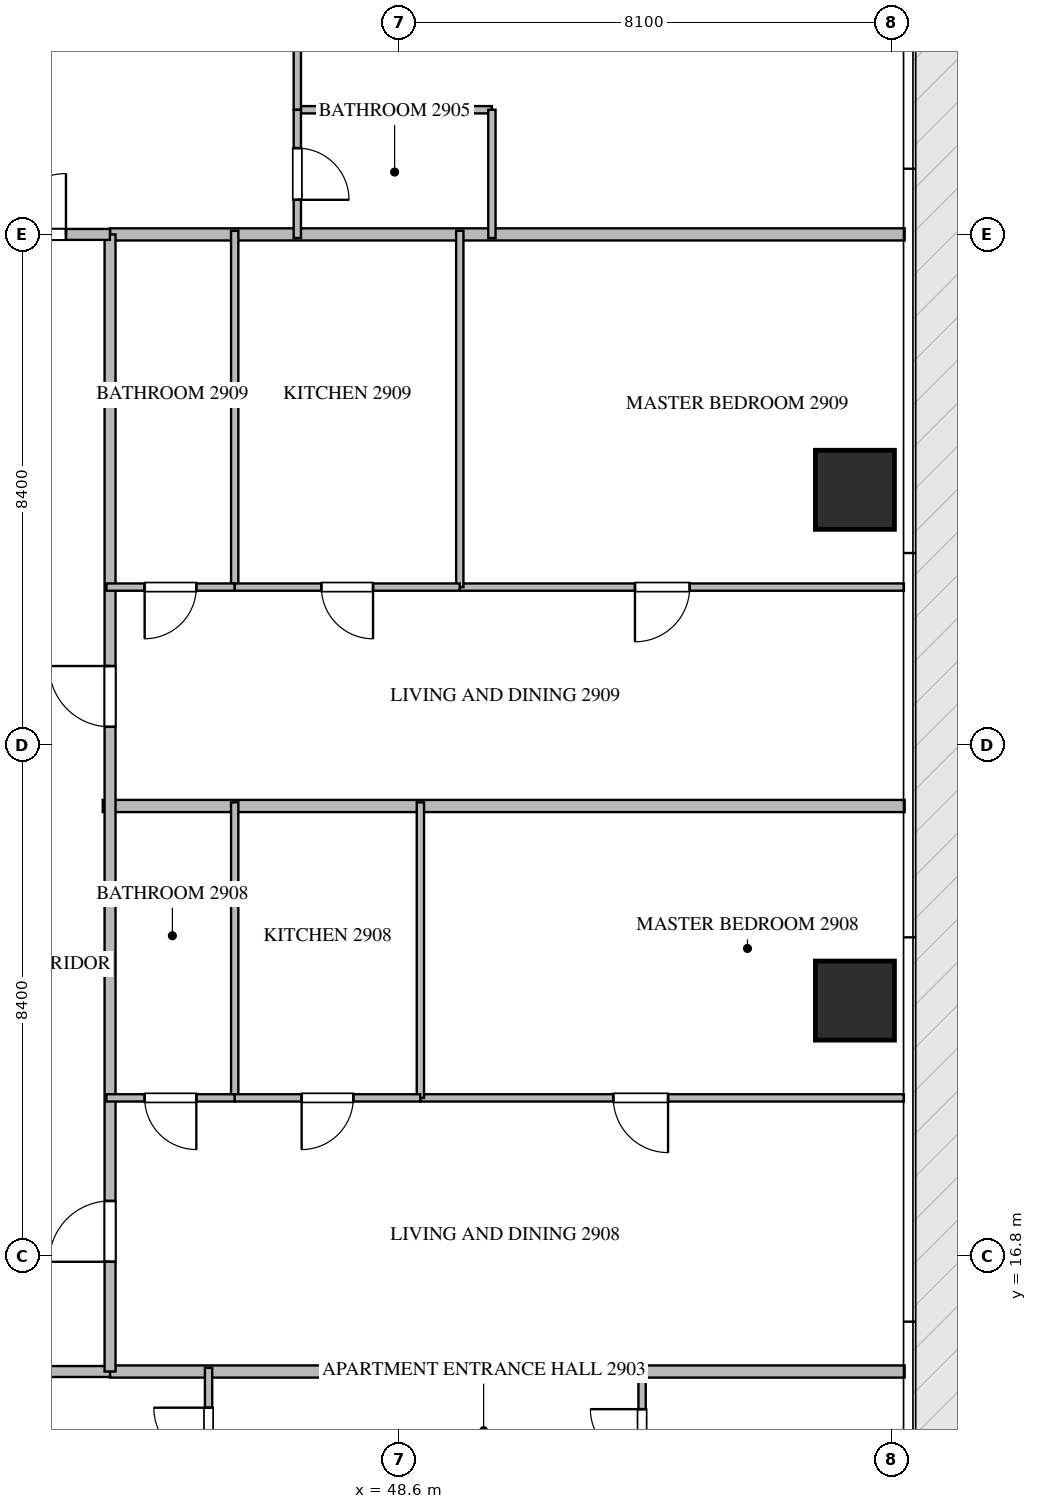
"""IFC4 building model, lengths in metres.
Left out: names, types, materials, properties, quantities, classifications, styles, units other than length and angle.
Written with IfcOpenShell. Run it as: python <this file> out.ifc"""

import sys

from ifc_helpers import new_model, si_unit, direction, frame, frame_2d, origin, origin_2d, place, context, subcontext, project, spatial, rectangle, extrude, source, transform, mapped, element, fill, save


model = new_model("IFC4")
c1 = context("Model", 3, precision=1e-05, world=origin(), true_north=direction((0.0, 1.0)))
c2 = subcontext(c1, "Body", "Model", "MODEL_VIEW")
j1 = project(units=[si_unit("LENGTHUNIT", "METRE"), si_unit("PLANEANGLEUNIT", "RADIAN")], contexts=[c1])
p1 = place(None, origin())
s1 = spatial("IfcSite", under=j1, at=p1, CompositionType="ELEMENT")
p2 = place(p1, origin())
s2 = spatial("IfcBuilding", under=s1, at=p2, CompositionType="ELEMENT")
p3 = place(p2, frame((0.0, 0.0, 120.15)))
s3 = spatial("IfcBuildingStorey", under=s2, at=p3, CompositionType="ELEMENT", Elevation=120.15)
m1 = source(origin(), c2, "Body", "SweptSolid", [
    extrude(rectangle(XDim=1.3, YDim=1.3, at=origin_2d()), origin(), (0.0, 0.0, 1.0), 3.93),
])
for number, where, z_axis, x_axis in (
    (1, (56.1, 21.0, -0.44), (0.0, 0.0, 1.0), (1.0, 0.0, 0.0)),
    (2, (56.1, 29.4, -0.44), (0.0, 0.0, 1.0), (1.0, 0.0, 0.0)),
):
    element("IfcColumn", number, at=place(p3, frame(where, z_axis=z_axis, x_axis=x_axis)), inside=s3, PredefinedType="COLUMN", context=c2, shape_type="MappedRepresentation", body=[
        mapped(m1, transform((0.0, 0.0, 0.0), scale=1.0)),
    ])
p4 = place(p3, frame((43.73, 24.2, 0.0), z_axis=(0.0, 0.0, 1.0), x_axis=(1.0, 0.0, 0.0)))
e3 = element("IfcWall", 3, at=p4, inside=s3, PredefinedType="PARTITIONING", context=c2, shape_type="SweptSolid", body=[
    extrude(rectangle(XDim=13.188, YDim=0.2, at=frame_2d((6.594, 0.0))), origin(), (0.0, 0.0, 1.0), 3.49),
])
for number, where, z_axis, x_axis in (
    (4, (43.85, 14.9, 0.0), (0.0, 0.0, 1.0), (1.0, 0.0, 0.0)),
    (5, (43.85, 33.6, 0.0), (0.0, 0.0, 1.0), (1.0, 0.0, 0.0)),
):
    element("IfcWall", number, at=place(p3, frame(where, z_axis=z_axis, x_axis=x_axis)), inside=s3, PredefinedType="PARTITIONING", context=c2, shape_type="SweptSolid", body=[
        extrude(rectangle(XDim=13.068, YDim=0.2, at=frame_2d((6.534, 0.0))), origin(), (0.0, 0.0, 1.0), 3.49),
    ])
p5 = place(p3, frame((20.952, 14.9, 0.0), z_axis=(0.0, 0.0, 1.0), x_axis=(1.0, 0.0, 0.0)))
e6 = element("IfcWall", 6, at=p5, inside=s3, PredefinedType="PARTITIONING", context=c2, shape_type="SweptSolid", body=[
    extrude(rectangle(XDim=22.896, YDim=0.18, at=frame_2d((11.448, 0.0))), origin(), (0.0, 0.0, 1.0), 3.49),
])
p6 = place(p5, frame((2.781, 0.0, 0.0)))
e7 = element("IfcOpeningElement", 7, at=p6, cuts=e6, PredefinedType="OPENING", context=c2, shape_type="SweptSolid", body=[
    extrude(rectangle(XDim=1.0, YDim=2.15, at=frame_2d((0.5, 1.075))), frame((0.0, 0.1, 0.0), z_axis=(0.0, -1.0, 0.0), x_axis=(1.0, 0.0, 0.0)), (0.0, 0.0, 1.0), 0.2),
])
p7 = place(p5, frame((7.16, 0.0, 0.0)))
e8 = element("IfcOpeningElement", 8, at=p7, cuts=e6, PredefinedType="OPENING", context=c2, shape_type="SweptSolid", body=[
    extrude(rectangle(XDim=1.0, YDim=2.15, at=frame_2d((0.5, 1.075))), frame((0.0, 0.1, 0.0), z_axis=(0.0, -1.0, 0.0), x_axis=(1.0, 0.0, 0.0)), (0.0, 0.0, 1.0), 0.2),
])
p8 = place(p5, frame((19.115, 0.0, 0.0)))
e9 = element("IfcOpeningElement", 9, at=p8, cuts=e6, PredefinedType="OPENING", context=c2, shape_type="SweptSolid", body=[
    extrude(rectangle(XDim=1.0, YDim=2.15, at=frame_2d((0.5, 1.075))), frame((0.0, 0.1, 0.0), z_axis=(0.0, -1.0, 0.0), x_axis=(1.0, 0.0, 0.0)), (0.0, 0.0, 1.0), 0.2),
])
p9 = place(p3, frame((43.85, 14.9, 0.0), z_axis=(0.0, 0.0, 1.0), x_axis=(0.0, 1.0, 0.0)))
e10 = element("IfcWall", 10, at=p9, inside=s3, PredefinedType="PARTITIONING", context=c2, shape_type="SweptSolid", body=[
    extrude(rectangle(XDim=18.7, YDim=0.18, at=frame_2d((9.35, 0.0))), origin(), (0.0, 0.0, 1.0), 3.49),
])
p10 = place(p9, frame((1.805, 0.0, 0.0)))
e11 = element("IfcOpeningElement", 11, at=p10, cuts=e10, PredefinedType="OPENING", context=c2, shape_type="SweptSolid", body=[
    extrude(rectangle(XDim=1.0, YDim=2.15, at=frame_2d((0.5, 1.075))), frame((0.0, 0.1, 0.0), z_axis=(0.0, -1.0, 0.0), x_axis=(1.0, 0.0, 0.0)), (0.0, 0.0, 1.0), 0.2),
])
p11 = place(p9, frame((10.602, 0.0, 0.0)))
e12 = element("IfcOpeningElement", 12, at=p11, cuts=e10, PredefinedType="OPENING", context=c2, shape_type="SweptSolid", body=[
    extrude(rectangle(XDim=1.0, YDim=2.15, at=frame_2d((0.5, 1.075))), frame((0.0, 0.1, 0.0), z_axis=(0.0, -1.0, 0.0), x_axis=(1.0, 0.0, 0.0)), (0.0, 0.0, 1.0), 0.2),
])
p12 = place(p3, frame((41.402, 33.6, 0.0), z_axis=(0.0, 0.0, 1.0), x_axis=(1.0, 0.0, 0.0)))
e13 = element("IfcWall", 13, at=p12, inside=s3, PredefinedType="PARTITIONING", context=c2, shape_type="SweptSolid", body=[
    extrude(rectangle(XDim=2.446, YDim=0.18, at=frame_2d((1.223, 0.0))), origin(), (0.0, 0.0, 1.0), 3.49),
])
p13 = place(p12, frame((0.723, 0.0, 0.0)))
e14 = element("IfcOpeningElement", 14, at=p13, cuts=e13, PredefinedType="OPENING", context=c2, shape_type="SweptSolid", body=[
    extrude(rectangle(XDim=1.0, YDim=2.15, at=frame_2d((0.5, 1.075))), frame((0.0, 0.1, 0.0), z_axis=(0.0, -1.0, 0.0), x_axis=(1.0, 0.0, 0.0)), (0.0, 0.0, 1.0), 0.2),
])
p14 = place(p3, frame((45.47, 12.75, 0.0), z_axis=(0.0, 0.0, 1.0), x_axis=(0.0, 1.0, 0.0)))
e15 = element("IfcWall", 15, at=p14, inside=s3, PredefinedType="PARTITIONING", context=c2, shape_type="SweptSolid", body=[
    extrude(rectangle(XDim=2.21, YDim=0.12, at=frame_2d((1.105, 0.0))), origin(), (0.0, 0.0, 1.0), 3.49),
])
p15 = place(p14, frame((0.655, 0.0, 0.0)))
e16 = element("IfcOpeningElement", 16, at=p15, cuts=e15, PredefinedType="OPENING", context=c2, shape_type="SweptSolid", body=[
    extrude(rectangle(XDim=0.9, YDim=2.1, at=frame_2d((0.45, 1.05))), frame((0.0, 0.07, 0.0), z_axis=(0.0, -1.0, 0.0), x_axis=(1.0, 0.0, 0.0)), (0.0, 0.0, 1.0), 0.14),
])
p16 = place(p3, frame((52.6, 12.752, 0.0), z_axis=(0.0, 0.0, 1.0), x_axis=(0.0, 1.0, 0.0)))
e17 = element("IfcWall", 17, at=p16, inside=s3, PredefinedType="PARTITIONING", context=c2, shape_type="SweptSolid", body=[
    extrude(rectangle(XDim=2.208, YDim=0.12, at=frame_2d((1.104, 0.0))), origin(), (0.0, 0.0, 1.0), 3.49),
])
p17 = place(p16, frame((0.679, 0.0, 0.0)))
e18 = element("IfcOpeningElement", 18, at=p17, cuts=e17, PredefinedType="OPENING", context=c2, shape_type="SweptSolid", body=[
    extrude(rectangle(XDim=0.85, YDim=2.1, at=frame_2d((0.425, 1.05))), frame((0.0, 0.07, 0.0), z_axis=(0.0, -1.0, 0.0), x_axis=(1.0, 0.0, 0.0)), (0.0, 0.0, 1.0), 0.14),
])
p18 = place(p3, frame((46.93, 35.65, 0.0), z_axis=(0.0, 0.0, 1.0), x_axis=(1.0, 0.0, 0.0)))
e19 = element("IfcWall", 19, at=p18, inside=s3, PredefinedType="PARTITIONING", context=c2, shape_type="SweptSolid", body=[
    extrude(rectangle(XDim=3.2, YDim=0.12, at=frame_2d((1.6, 0.0))), origin(), (0.0, 0.0, 1.0), 3.49),
])
p19 = place(p3, frame((50.13, 35.65, 0.0), z_axis=(0.0, 0.0, 1.0), x_axis=(0.0, -1.0, 0.0)))
e20 = element("IfcWall", 20, at=p19, inside=s3, PredefinedType="PARTITIONING", context=c2, shape_type="SweptSolid", body=[
    extrude(rectangle(XDim=2.11, YDim=0.12, at=frame_2d((1.055, 0.0))), origin(), (0.0, 0.0, 1.0), 3.49),
])
p20 = place(p3, frame((46.93, 41.073, 0.0), z_axis=(0.0, 0.0, 1.0), x_axis=(0.0, -1.0, 0.0)))
e21 = element("IfcWall", 21, at=p20, inside=s3, PredefinedType="PARTITIONING", context=c2, shape_type="SweptSolid", body=[
    extrude(rectangle(XDim=5.423, YDim=0.12, at=frame_2d((2.711, 0.0))), origin(), (0.0, 0.0, 1.0), 3.49),
])
p21 = place(p20, frame((2.287, 0.0, 0.0)))
e22 = element("IfcOpeningElement", 22, at=p21, cuts=e21, PredefinedType="OPENING", context=c2, shape_type="SweptSolid", body=[
    extrude(rectangle(XDim=0.85, YDim=2.1, at=frame_2d((0.425, 1.05))), frame((0.0, 0.07, 0.0), z_axis=(0.0, -1.0, 0.0), x_axis=(1.0, 0.0, 0.0)), (0.0, 0.0, 1.0), 0.14),
])
p22 = place(p3, frame((46.93, 35.648, 0.0), z_axis=(0.0, 0.0, 1.0), x_axis=(0.0, -1.0, 0.0)))
e23 = element("IfcWall", 23, at=p22, inside=s3, PredefinedType="PARTITIONING", context=c2, shape_type="SweptSolid", body=[
    extrude(rectangle(XDim=2.108, YDim=0.12, at=frame_2d((1.054, 0.0))), origin(), (0.0, 0.0, 1.0), 3.49),
])
p23 = place(p22, frame((0.629, 0.0, 0.0)))
e24 = element("IfcOpeningElement", 24, at=p23, cuts=e23, PredefinedType="OPENING", context=c2, shape_type="SweptSolid", body=[
    extrude(rectangle(XDim=0.85, YDim=2.1, at=frame_2d((0.425, 1.05))), frame((0.0, 0.07, 0.0), z_axis=(0.0, -1.0, 0.0), x_axis=(1.0, 0.0, 0.0)), (0.0, 0.0, 1.0), 0.14),
])
p24 = place(p3, frame((56.905, 19.4, 0.0), z_axis=(0.0, 0.0, 1.0), x_axis=(-1.0, 0.0, 0.0)))
e25 = element("IfcWall", 25, at=p24, inside=s3, PredefinedType="PARTITIONING", context=c2, shape_type="SweptSolid", body=[
    extrude(rectangle(XDim=7.951, YDim=0.12, at=frame_2d((3.976, 0.0))), origin(), (0.0, 0.0, 1.0), 3.49),
])
p25 = place(p24, frame((3.878, 0.0, 0.0)))
e26 = element("IfcOpeningElement", 26, at=p25, cuts=e25, PredefinedType="OPENING", context=c2, shape_type="SweptSolid", body=[
    extrude(rectangle(XDim=0.9, YDim=2.1, at=frame_2d((0.45, 1.05))), frame((0.0, 0.07, 0.0), z_axis=(0.0, -1.0, 0.0), x_axis=(1.0, 0.0, 0.0)), (0.0, 0.0, 1.0), 0.14),
])
for number, where, z_axis, x_axis in (
    (27, (48.954, 19.4, 0.0), (0.0, 0.0, 1.0), (0.0, 1.0, 0.0)),
    (28, (45.9, 19.4, 0.0), (0.0, 0.0, 1.0), (0.0, 1.0, 0.0)),
):
    element("IfcWall", number, at=place(p3, frame(where, z_axis=z_axis, x_axis=x_axis)), inside=s3, PredefinedType="PARTITIONING", context=c2, shape_type="SweptSolid", body=[
        extrude(rectangle(XDim=4.86, YDim=0.12, at=frame_2d((2.43, 0.0))), origin(), (0.0, 0.0, 1.0), 3.49),
    ])
p26 = place(p3, frame((48.952, 19.4, 0.0), z_axis=(0.0, 0.0, 1.0), x_axis=(-1.0, 0.0, 0.0)))
e29 = element("IfcWall", 29, at=p26, inside=s3, PredefinedType="PARTITIONING", context=c2, shape_type="SweptSolid", body=[
    extrude(rectangle(XDim=3.052, YDim=0.12, at=frame_2d((1.526, 0.0))), origin(), (0.0, 0.0, 1.0), 3.49),
])
p27 = place(p26, frame((1.101, 0.0, 0.0)))
e30 = element("IfcOpeningElement", 30, at=p27, cuts=e29, PredefinedType="OPENING", context=c2, shape_type="SweptSolid", body=[
    extrude(rectangle(XDim=0.85, YDim=2.1, at=frame_2d((0.425, 1.05))), frame((0.0, 0.07, 0.0), z_axis=(0.0, -1.0, 0.0), x_axis=(1.0, 0.0, 0.0)), (0.0, 0.0, 1.0), 0.14),
])
p28 = place(p3, frame((45.898, 19.4, 0.0), z_axis=(0.0, 0.0, 1.0), x_axis=(-1.0, 0.0, 0.0)))
e31 = element("IfcWall", 31, at=p28, inside=s3, PredefinedType="PARTITIONING", context=c2, shape_type="SweptSolid", body=[
    extrude(rectangle(XDim=2.108, YDim=0.12, at=frame_2d((1.054, 0.0))), origin(), (0.0, 0.0, 1.0), 3.49),
])
p29 = place(p28, frame((0.629, 0.0, 0.0)))
e32 = element("IfcOpeningElement", 32, at=p29, cuts=e31, PredefinedType="OPENING", context=c2, shape_type="SweptSolid", body=[
    extrude(rectangle(XDim=0.85, YDim=2.1, at=frame_2d((0.425, 1.05))), frame((0.0, 0.07, 0.0), z_axis=(0.0, -1.0, 0.0), x_axis=(1.0, 0.0, 0.0)), (0.0, 0.0, 1.0), 0.14),
])
p30 = place(p3, frame((56.905, 27.8, 0.0), z_axis=(0.0, 0.0, 1.0), x_axis=(-1.0, 0.0, 0.0)))
e33 = element("IfcWall", 33, at=p30, inside=s3, PredefinedType="PARTITIONING", context=c2, shape_type="SweptSolid", body=[
    extrude(rectangle(XDim=7.303, YDim=0.12, at=frame_2d((3.651, 0.0))), origin(), (0.0, 0.0, 1.0), 3.49),
])
p31 = place(p30, frame((3.522, 0.0, 0.0)))
e34 = element("IfcOpeningElement", 34, at=p31, cuts=e33, PredefinedType="OPENING", context=c2, shape_type="SweptSolid", body=[
    extrude(rectangle(XDim=0.9, YDim=2.1, at=frame_2d((0.45, 1.05))), frame((0.0, 0.07, 0.0), z_axis=(0.0, -1.0, 0.0), x_axis=(1.0, 0.0, 0.0)), (0.0, 0.0, 1.0), 0.14),
])
for number, where, z_axis, x_axis in (
    (35, (49.602, 27.8, 0.0), (0.0, 0.0, 1.0), (0.0, 1.0, 0.0)),
    (36, (45.9, 27.8, 0.0), (0.0, 0.0, 1.0), (0.0, 1.0, 0.0)),
):
    element("IfcWall", number, at=place(p3, frame(where, z_axis=z_axis, x_axis=x_axis)), inside=s3, PredefinedType="PARTITIONING", context=c2, shape_type="SweptSolid", body=[
        extrude(rectangle(XDim=5.86, YDim=0.12, at=frame_2d((2.93, 0.0))), origin(), (0.0, 0.0, 1.0), 3.49),
    ])
p32 = place(p3, frame((49.6, 27.8, 0.0), z_axis=(0.0, 0.0, 1.0), x_axis=(-1.0, 0.0, 0.0)))
e37 = element("IfcWall", 37, at=p32, inside=s3, PredefinedType="PARTITIONING", context=c2, shape_type="SweptSolid", body=[
    extrude(rectangle(XDim=3.7, YDim=0.12, at=frame_2d((1.85, 0.0))), origin(), (0.0, 0.0, 1.0), 3.49),
])
p33 = place(p32, frame((1.425, 0.0, 0.0)))
e38 = element("IfcOpeningElement", 38, at=p33, cuts=e37, PredefinedType="OPENING", context=c2, shape_type="SweptSolid", body=[
    extrude(rectangle(XDim=0.85, YDim=2.1, at=frame_2d((0.425, 1.05))), frame((0.0, 0.07, 0.0), z_axis=(0.0, -1.0, 0.0), x_axis=(1.0, 0.0, 0.0)), (0.0, 0.0, 1.0), 0.14),
])
p34 = place(p3, frame((45.898, 27.8, 0.0), z_axis=(0.0, 0.0, 1.0), x_axis=(-1.0, 0.0, 0.0)))
e39 = element("IfcWall", 39, at=p34, inside=s3, PredefinedType="PARTITIONING", context=c2, shape_type="SweptSolid", body=[
    extrude(rectangle(XDim=2.108, YDim=0.12, at=frame_2d((1.054, 0.0))), origin(), (0.0, 0.0, 1.0), 3.49),
])
p35 = place(p34, frame((0.629, 0.0, 0.0)))
e40 = element("IfcOpeningElement", 40, at=p35, cuts=e39, PredefinedType="OPENING", context=c2, shape_type="SweptSolid", body=[
    extrude(rectangle(XDim=0.85, YDim=2.1, at=frame_2d((0.425, 1.05))), frame((0.0, 0.07, 0.0), z_axis=(0.0, -1.0, 0.0), x_axis=(1.0, 0.0, 0.0)), (0.0, 0.0, 1.0), 0.14),
])
m2 = source(origin(), c2, "Body", "SweptSolid", [
    extrude(rectangle(XDim=1.0, YDim=2.15, at=frame_2d((0.5, 1.075))), frame((0.0, 0.025, 0.0), z_axis=(0.0, -1.0, 0.0), x_axis=(1.0, 0.0, 0.0)), (0.0, 0.0, 1.0), 0.05),
])
p36 = place(p10, origin())
e41 = element("IfcDoor", 41, at=p36, inside=s3, OperationType="SINGLE_SWING_LEFT", PredefinedType="DOOR", context=c2, shape_type="MappedRepresentation", body=[
    mapped(m2, transform((0.0, 0.0, 0.0), scale=1.0)),
])
fill(e11, e41)
p37 = place(p11, origin())
e42 = element("IfcDoor", 42, at=p37, inside=s3, OperationType="SINGLE_SWING_RIGHT", PredefinedType="DOOR", context=c2, shape_type="MappedRepresentation", body=[
    mapped(m2, transform((0.0, 0.0, 0.0), scale=1.0)),
])
fill(e12, e42)
p38 = place(p13, origin())
e43 = element("IfcDoor", 43, at=p38, inside=s3, OperationType="SINGLE_SWING_RIGHT", PredefinedType="DOOR", context=c2, shape_type="MappedRepresentation", body=[
    mapped(m2, transform((0.0, 0.0, 0.0), scale=1.0)),
])
fill(e14, e43)
m3 = source(origin(), c2, "Body", "SweptSolid", [
    extrude(rectangle(XDim=0.9, YDim=2.1, at=frame_2d((0.45, 1.05))), frame((0.0, 0.025, 0.0), z_axis=(0.0, -1.0, 0.0), x_axis=(1.0, 0.0, 0.0)), (0.0, 0.0, 1.0), 0.05),
])
p39 = place(p15, origin())
e44 = element("IfcDoor", 44, at=p39, inside=s3, OperationType="SINGLE_SWING_RIGHT", PredefinedType="DOOR", context=c2, shape_type="MappedRepresentation", body=[
    mapped(m3, transform((0.0, 0.0, 0.0), scale=1.0)),
])
fill(e16, e44)
m4 = source(origin(), c2, "Body", "SweptSolid", [
    extrude(rectangle(XDim=0.85, YDim=2.1, at=frame_2d((0.425, 1.05))), frame((0.0, 0.025, 0.0), z_axis=(0.0, -1.0, 0.0), x_axis=(1.0, 0.0, 0.0)), (0.0, 0.0, 1.0), 0.05),
])
p40 = place(p17, origin())
e45 = element("IfcDoor", 45, at=p40, inside=s3, OperationType="SINGLE_SWING_RIGHT", PredefinedType="DOOR", context=c2, shape_type="MappedRepresentation", body=[
    mapped(m4, transform((0.0, 0.0, 0.0), scale=1.0)),
])
fill(e18, e45)
p41 = place(p23, origin())
e46 = element("IfcDoor", 46, at=p41, inside=s3, OperationType="SINGLE_SWING_RIGHT", PredefinedType="DOOR", context=c2, shape_type="MappedRepresentation", body=[
    mapped(m4, transform((0.0, 0.0, 0.0), scale=1.0)),
])
fill(e24, e46)
p42 = place(p25, origin())
e47 = element("IfcDoor", 47, at=p42, inside=s3, OperationType="SINGLE_SWING_LEFT", PredefinedType="DOOR", context=c2, shape_type="MappedRepresentation", body=[
    mapped(m3, transform((0.0, 0.0, 0.0), scale=1.0)),
])
fill(e26, e47)
p43 = place(p27, origin())
e48 = element("IfcDoor", 48, at=p43, inside=s3, OperationType="SINGLE_SWING_RIGHT", PredefinedType="DOOR", context=c2, shape_type="MappedRepresentation", body=[
    mapped(m4, transform((0.0, 0.0, 0.0), scale=1.0)),
])
fill(e30, e48)
p44 = place(p29, origin())
e49 = element("IfcDoor", 49, at=p44, inside=s3, OperationType="SINGLE_SWING_LEFT", PredefinedType="DOOR", context=c2, shape_type="MappedRepresentation", body=[
    mapped(m4, transform((0.0, 0.0, 0.0), scale=1.0)),
])
fill(e32, e49)
p45 = place(p31, origin())
e50 = element("IfcDoor", 50, at=p45, inside=s3, OperationType="SINGLE_SWING_RIGHT", PredefinedType="DOOR", context=c2, shape_type="MappedRepresentation", body=[
    mapped(m3, transform((0.0, 0.0, 0.0), scale=1.0)),
])
fill(e34, e50)
p46 = place(p33, origin())
e51 = element("IfcDoor", 51, at=p46, inside=s3, OperationType="SINGLE_SWING_LEFT", PredefinedType="DOOR", context=c2, shape_type="MappedRepresentation", body=[
    mapped(m4, transform((0.0, 0.0, 0.0), scale=1.0)),
])
fill(e38, e51)
p47 = place(p35, origin())
e52 = element("IfcDoor", 52, at=p47, inside=s3, OperationType="SINGLE_SWING_RIGHT", PredefinedType="DOOR", context=c2, shape_type="MappedRepresentation", body=[
    mapped(m4, transform((0.0, 0.0, 0.0), scale=1.0)),
])
fill(e40, e52)
save(model, sys.argv[1])
